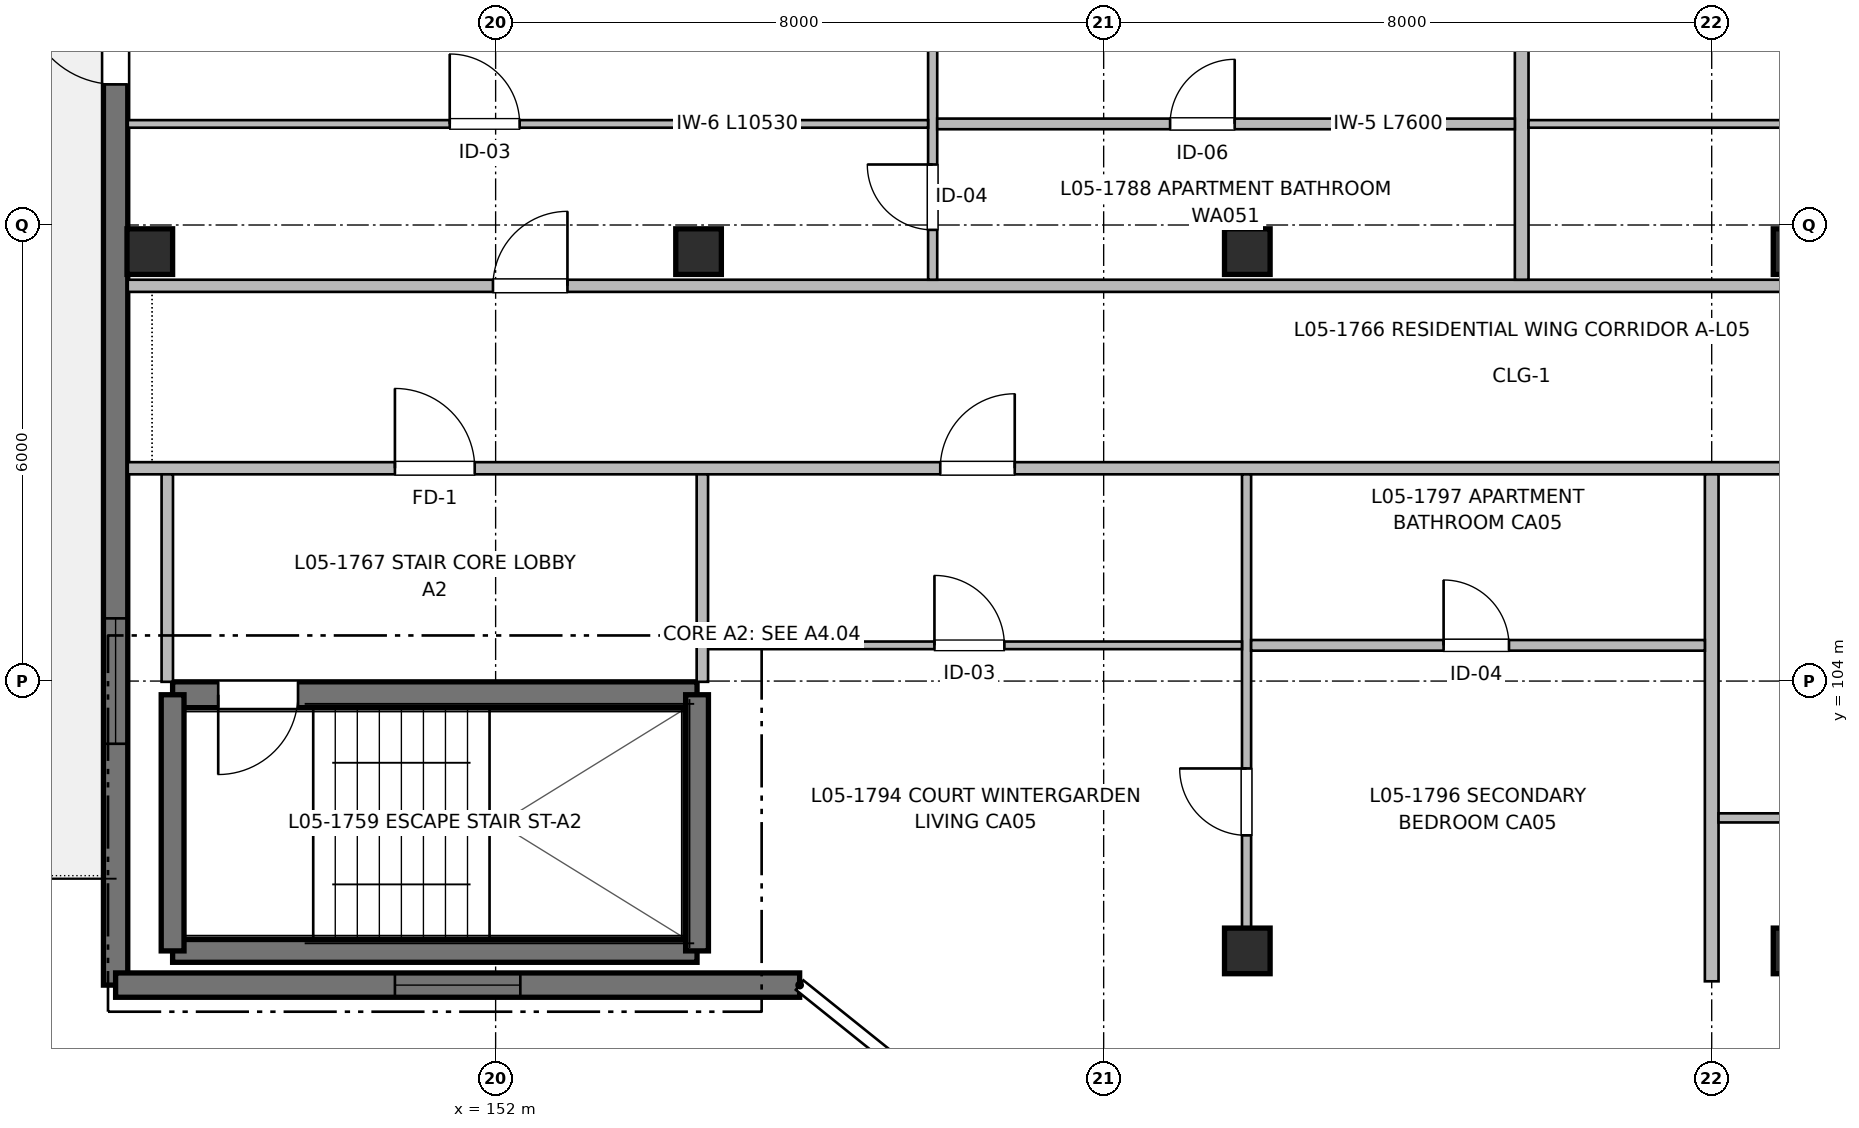
"""IFC4 building model, lengths in metres.
Left out: names, types, materials, properties, quantities, classifications, styles, units other than length and angle.
Written with IfcOpenShell. Run it as: python <this file> out.ifc"""

import sys

from ifc_helpers import new_model, si_unit, direction, frame, frame_2d, origin, origin_2d, place, context, subcontext, project, spatial, rectangle, extrude, element, fill, save


model = new_model("IFC4")
c1 = context("Model", 3, precision=1e-05, world=origin(), true_north=direction((0.0, 1.0)))
c2 = subcontext(c1, "Body", "Model", "MODEL_VIEW")
j1 = project(units=[si_unit("LENGTHUNIT", "METRE"), si_unit("PLANEANGLEUNIT", "RADIAN")], contexts=[c1])
p1 = place(None, origin())
s1 = spatial("IfcSite", under=j1, at=p1, CompositionType="ELEMENT")
p2 = place(p1, origin())
s2 = spatial("IfcBuilding", under=s1, at=p2, CompositionType="ELEMENT")
p3 = place(p2, frame((0.0, 0.0, 16.96)))
s3 = spatial("IfcBuildingStorey", under=s2, at=p3, CompositionType="ELEMENT", Elevation=16.96)
for number, where, z_axis, x_axis in (
    (1, (147.45, 109.65, 0.0), (0.0, 0.0, 1.0), (1.0, 0.0, 0.0)),
    (2, (154.67, 109.65, 0.0), (0.0, 0.0, 1.0), (1.0, 0.0, 0.0)),
    (3, (161.89, 100.45, 0.0), (0.0, 0.0, 1.0), (1.0, 0.0, 0.0)),
    (4, (161.89, 109.65, 0.0), (0.0, 0.0, 1.0), (1.0, 0.0, 0.0)),
    (5, (169.11, 100.45, 0.0), (0.0, 0.0, 1.0), (1.0, 0.0, 0.0)),
    (6, (169.11, 109.65, 0.0), (0.0, 0.0, 1.0), (1.0, 0.0, 0.0)),
):
    element("IfcColumn", number, at=place(p3, frame(where, z_axis=z_axis, x_axis=x_axis)), inside=s3, PredefinedType="COLUMN", context=c2, shape_type="SweptSolid", body=[
        extrude(rectangle(XDim=0.6, YDim=0.6, at=origin_2d()), origin(), (0.0, 0.0, 1.0), 3.2),
    ])
p4 = place(p3, frame((147.75, 100.45, 0.0), z_axis=(0.0, 0.0, 1.0), x_axis=(1.0, 0.0, 0.0)))
e7 = element("IfcWall", 7, at=p4, inside=s3, PredefinedType="SHEAR", context=c2, shape_type="SweptSolid", body=[
    extrude(rectangle(XDim=6.9, YDim=0.3, at=frame_2d((3.45, 0.0))), origin(), (0.0, 0.0, 1.0), 3.2),
])
p5 = place(p3, frame((154.65, 103.82, 0.0), z_axis=(0.0, 0.0, 1.0), x_axis=(-1.0, 0.0, 0.0)))
e8 = element("IfcWall", 8, at=p5, inside=s3, PredefinedType="SHEAR", context=c2, shape_type="SweptSolid", body=[
    extrude(rectangle(XDim=6.9, YDim=0.34, at=frame_2d((3.45, 0.0))), origin(), (0.0, 0.0, 1.0), 3.2),
])
p6 = place(p5, frame((5.25, 0.0, 0.0)))
e9 = element("IfcOpeningElement", 9, at=p6, cuts=e8, PredefinedType="OPENING", context=c2, shape_type="SweptSolid", body=[
    extrude(rectangle(XDim=1.05, YDim=2.15, at=frame_2d((0.525, 1.075))), frame((0.0, 0.18, 0.0), z_axis=(0.0, -1.0, 0.0), x_axis=(1.0, 0.0, 0.0)), (0.0, 0.0, 1.0), 0.36),
])
for number, where, z_axis, x_axis in (
    (10, (147.75, 103.82, 0.0), (0.0, 0.0, 1.0), (0.0, -1.0, 0.0)),
    (11, (154.65, 100.45, 0.0), (0.0, 0.0, 1.0), (0.0, 1.0, 0.0)),
):
    element("IfcWall", number, at=place(p3, frame(where, z_axis=z_axis, x_axis=x_axis)), inside=s3, PredefinedType="SHEAR", context=c2, shape_type="SweptSolid", body=[
        extrude(rectangle(XDim=3.37, YDim=0.3, at=frame_2d((1.685, 0.0))), origin(), (0.0, 0.0, 1.0), 3.2),
    ])
p7 = place(p3, frame((147.0, 100.0, 0.0), z_axis=(0.0, 0.0, 1.0), x_axis=(0.0, 1.0, 0.0)))
e12 = element("IfcWall", 12, at=p7, inside=s3, PredefinedType="SHEAR", context=c2, shape_type="SweptSolid", body=[
    extrude(rectangle(XDim=16.0, YDim=0.32, at=frame_2d((8.0, 0.0))), origin(), (0.0, 0.0, 1.0), 2.98),
])
p8 = place(p7, frame((3.175, 0.0, 0.77)))
e13 = element("IfcOpeningElement", 13, at=p8, cuts=e12, PredefinedType="OPENING", context=c2, shape_type="SweptSolid", body=[
    extrude(rectangle(XDim=1.65, YDim=1.45, at=frame_2d((0.825, 0.725))), frame((0.0, 0.17, 0.0), z_axis=(0.0, -1.0, 0.0), x_axis=(1.0, 0.0, 0.0)), (0.0, 0.0, 1.0), 0.34),
])
p9 = place(p7, frame((11.85, 0.0, 0.0)))
e14 = element("IfcOpeningElement", 14, at=p9, cuts=e12, PredefinedType="OPENING", context=c2, shape_type="SweptSolid", body=[
    extrude(rectangle(XDim=1.2, YDim=2.2, at=frame_2d((0.6, 1.1))), frame((0.0, 0.17, 0.0), z_axis=(0.0, -1.0, 0.0), x_axis=(1.0, 0.0, 0.0)), (0.0, 0.0, 1.0), 0.34),
])
p10 = place(p7, frame((13.3, 0.0, 0.9)))
e15 = element("IfcOpeningElement", 15, at=p10, cuts=e12, PredefinedType="OPENING", context=c2, shape_type="SweptSolid", body=[
    extrude(rectangle(XDim=0.65, YDim=0.95, at=frame_2d((0.325, 0.475))), frame((0.0, 0.17, 0.0), z_axis=(0.0, -1.0, 0.0), x_axis=(1.0, 0.0, 0.0)), (0.0, 0.0, 1.0), 0.34),
])
p11 = place(p3, frame((156.0, 100.0, 0.0), z_axis=(0.0, 0.0, 1.0), x_axis=(-1.0, 0.0, 0.0)))
e16 = element("IfcWall", 16, at=p11, inside=s3, PredefinedType="SHEAR", context=c2, shape_type="SweptSolid", body=[
    extrude(rectangle(XDim=9.0, YDim=0.32, at=frame_2d((4.5, 0.0))), origin(), (0.0, 0.0, 1.0), 2.98),
])
p12 = place(p11, frame((3.675, 0.0, 0.77)))
e17 = element("IfcOpeningElement", 17, at=p12, cuts=e16, PredefinedType="OPENING", context=c2, shape_type="SweptSolid", body=[
    extrude(rectangle(XDim=1.65, YDim=1.45, at=frame_2d((0.825, 0.725))), frame((0.0, 0.17, 0.0), z_axis=(0.0, -1.0, 0.0), x_axis=(1.0, 0.0, 0.0)), (0.0, 0.0, 1.0), 0.34),
])
p13 = place(p3, frame((147.16, 106.8, 0.0), z_axis=(0.0, 0.0, 1.0), x_axis=(1.0, 0.0, 0.0)))
e18 = element("IfcWall", 18, at=p13, inside=s3, PredefinedType="PARTITIONING", context=c2, shape_type="SweptSolid", body=[
    extrude(rectangle(XDim=27.64, YDim=0.16, at=frame_2d((13.82, 0.0))), origin(), (0.0, 0.0, 1.0), 2.935),
])
p14 = place(p13, frame((3.515, 0.0, 0.0)))
e19 = element("IfcOpeningElement", 19, at=p14, cuts=e18, PredefinedType="OPENING", context=c2, shape_type="SweptSolid", body=[
    extrude(rectangle(XDim=1.05, YDim=2.15, at=frame_2d((0.525, 1.075))), frame((0.0, 0.09, 0.0), z_axis=(0.0, -1.0, 0.0), x_axis=(1.0, 0.0, 0.0)), (0.0, 0.0, 1.0), 0.18),
])
p15 = place(p13, frame((10.69, 0.0, 0.0)))
e20 = element("IfcOpeningElement", 20, at=p15, cuts=e18, PredefinedType="OPENING", context=c2, shape_type="SweptSolid", body=[
    extrude(rectangle(XDim=0.98, YDim=2.15, at=frame_2d((0.49, 1.075))), frame((0.0, 0.09, 0.0), z_axis=(0.0, -1.0, 0.0), x_axis=(1.0, 0.0, 0.0)), (0.0, 0.0, 1.0), 0.18),
])
p16 = place(p3, frame((147.16, 109.2, 0.0), z_axis=(0.0, 0.0, 1.0), x_axis=(1.0, 0.0, 0.0)))
e21 = element("IfcWall", 21, at=p16, inside=s3, PredefinedType="PARTITIONING", context=c2, shape_type="SweptSolid", body=[
    extrude(rectangle(XDim=36.68, YDim=0.16, at=frame_2d((18.34, 0.0))), origin(), (0.0, 0.0, 1.0), 2.935),
])
p17 = place(p16, frame((4.805, 0.0, 0.0)))
e22 = element("IfcOpeningElement", 22, at=p17, cuts=e21, PredefinedType="OPENING", context=c2, shape_type="SweptSolid", body=[
    extrude(rectangle(XDim=0.98, YDim=2.15, at=frame_2d((0.49, 1.075))), frame((0.0, 0.09, 0.0), z_axis=(0.0, -1.0, 0.0), x_axis=(1.0, 0.0, 0.0)), (0.0, 0.0, 1.0), 0.18),
])
p18 = place(p16, frame((23.235, 0.0, 0.0)))
e23 = element("IfcOpeningElement", 23, at=p18, cuts=e21, PredefinedType="OPENING", context=c2, shape_type="SweptSolid", body=[
    extrude(rectangle(XDim=0.98, YDim=2.15, at=frame_2d((0.49, 1.075))), frame((0.0, 0.09, 0.0), z_axis=(0.0, -1.0, 0.0), x_axis=(1.0, 0.0, 0.0)), (0.0, 0.0, 1.0), 0.18),
])
p19 = place(p3, frame((168.0, 100.05, 0.0), z_axis=(0.0, 0.0, 1.0), x_axis=(0.0, 1.0, 0.0)))
e24 = element("IfcWall", 24, at=p19, inside=s3, PredefinedType="PARTITIONING", context=c2, shape_type="SweptSolid", body=[
    extrude(rectangle(XDim=6.67, YDim=0.18, at=frame_2d((3.335, 0.0))), origin(), (0.0, 0.0, 1.0), 2.935),
])
for number, where, z_axis, x_axis in (
    (25, (147.68, 103.99, 0.0), (0.0, 0.0, 1.0), (0.0, 1.0, 0.0)),
    (26, (154.72, 103.99, 0.0), (0.0, 0.0, 1.0), (0.0, 1.0, 0.0)),
):
    element("IfcWall", number, at=place(p3, frame(where, z_axis=z_axis, x_axis=x_axis)), inside=s3, PredefinedType="PARTITIONING", context=c2, shape_type="SweptSolid", body=[
        extrude(rectangle(XDim=2.73, YDim=0.15, at=frame_2d((1.365, 0.0))), origin(), (0.0, 0.0, 1.0), 2.935),
    ])
p20 = place(p3, frame((168.09, 102.2, 0.0), z_axis=(0.0, 0.0, 1.0), x_axis=(1.0, 0.0, 0.0)))
e27 = element("IfcWall", 27, at=p20, inside=s3, PredefinedType="PARTITIONING", context=c2, shape_type="SweptSolid", body=[
    extrude(rectangle(XDim=4.19, YDim=0.12, at=frame_2d((2.095, 0.0))), origin(), (0.0, 0.0, 1.0), 2.935),
])
p21 = place(p20, frame((1.655, 0.0, 0.0)))
e28 = element("IfcOpeningElement", 28, at=p21, cuts=e27, PredefinedType="OPENING", context=c2, shape_type="SweptSolid", body=[
    extrude(rectangle(XDim=0.88, YDim=2.1, at=frame_2d((0.44, 1.05))), frame((0.0, 0.07, 0.0), z_axis=(0.0, -1.0, 0.0), x_axis=(1.0, 0.0, 0.0)), (0.0, 0.0, 1.0), 0.14),
])
p22 = place(p3, frame((165.5, 109.28, 0.0), z_axis=(0.0, 0.0, 1.0), x_axis=(0.0, 1.0, 0.0)))
e29 = element("IfcWall", 29, at=p22, inside=s3, PredefinedType="PARTITIONING", context=c2, shape_type="SweptSolid", body=[
    extrude(rectangle(XDim=6.59, YDim=0.18, at=frame_2d((3.295, 0.0))), origin(), (0.0, 0.0, 1.0), 2.935),
])
p23 = place(p3, frame((157.75, 109.28, 0.0), z_axis=(0.0, 0.0, 1.0), x_axis=(0.0, 1.0, 0.0)))
e30 = element("IfcWall", 30, at=p23, inside=s3, PredefinedType="PARTITIONING", context=c2, shape_type="SweptSolid", body=[
    extrude(rectangle(XDim=6.59, YDim=0.12, at=frame_2d((3.295, 0.0))), origin(), (0.0, 0.0, 1.0), 2.935),
])
p24 = place(p23, frame((0.656, 0.0, 0.0)))
e31 = element("IfcOpeningElement", 31, at=p24, cuts=e30, PredefinedType="OPENING", context=c2, shape_type="SweptSolid", body=[
    extrude(rectangle(XDim=0.86, YDim=2.1, at=frame_2d((0.43, 1.05))), frame((0.0, 0.07, 0.0), z_axis=(0.0, -1.0, 0.0), x_axis=(1.0, 0.0, 0.0)), (0.0, 0.0, 1.0), 0.14),
])
p25 = place(p23, frame((4.093, 0.0, 0.0)))
e32 = element("IfcOpeningElement", 32, at=p25, cuts=e30, PredefinedType="OPENING", context=c2, shape_type="SweptSolid", body=[
    extrude(rectangle(XDim=0.9, YDim=2.1, at=frame_2d((0.45, 1.05))), frame((0.0, 0.07, 0.0), z_axis=(0.0, -1.0, 0.0), x_axis=(1.0, 0.0, 0.0)), (0.0, 0.0, 1.0), 0.14),
])
p26 = place(p3, frame((157.81, 111.33, 0.0), z_axis=(0.0, 0.0, 1.0), x_axis=(1.0, 0.0, 0.0)))
e33 = element("IfcWall", 33, at=p26, inside=s3, PredefinedType="PARTITIONING", context=c2, shape_type="SweptSolid", body=[
    extrude(rectangle(XDim=7.6, YDim=0.14, at=frame_2d((3.8, 0.0))), origin(), (0.0, 0.0, 1.0), 2.935),
])
p27 = place(p26, frame((3.064, 0.0, 0.0)))
e34 = element("IfcOpeningElement", 34, at=p27, cuts=e33, PredefinedType="OPENING", context=c2, shape_type="SweptSolid", body=[
    extrude(rectangle(XDim=0.85, YDim=2.05, at=frame_2d((0.425, 1.025))), frame((0.0, 0.08, 0.0), z_axis=(0.0, -1.0, 0.0), x_axis=(1.0, 0.0, 0.0)), (0.0, 0.0, 1.0), 0.16),
])
p28 = place(p3, frame((147.16, 111.33, 0.0), z_axis=(0.0, 0.0, 1.0), x_axis=(1.0, 0.0, 0.0)))
e35 = element("IfcWall", 35, at=p28, inside=s3, PredefinedType="PARTITIONING", context=c2, shape_type="SweptSolid", body=[
    extrude(rectangle(XDim=10.53, YDim=0.1, at=frame_2d((5.265, 0.0))), origin(), (0.0, 0.0, 1.0), 2.935),
])
p29 = place(p28, frame((4.236, 0.0, 0.0)))
e36 = element("IfcOpeningElement", 36, at=p29, cuts=e35, PredefinedType="OPENING", context=c2, shape_type="SweptSolid", body=[
    extrude(rectangle(XDim=0.92, YDim=2.1, at=frame_2d((0.46, 1.05))), frame((0.0, 0.06, 0.0), z_axis=(0.0, -1.0, 0.0), x_axis=(1.0, 0.0, 0.0)), (0.0, 0.0, 1.0), 0.12),
])
p30 = place(p3, frame((165.59, 111.33, 0.0), z_axis=(0.0, 0.0, 1.0), x_axis=(1.0, 0.0, 0.0)))
e37 = element("IfcWall", 37, at=p30, inside=s3, PredefinedType="PARTITIONING", context=c2, shape_type="SweptSolid", body=[
    extrude(rectangle(XDim=10.53, YDim=0.1, at=frame_2d((5.265, 0.0))), origin(), (0.0, 0.0, 1.0), 2.935),
])
p31 = place(p30, frame((4.236, 0.0, 0.0)))
e38 = element("IfcOpeningElement", 38, at=p31, cuts=e37, PredefinedType="OPENING", context=c2, shape_type="SweptSolid", body=[
    extrude(rectangle(XDim=0.92, YDim=2.1, at=frame_2d((0.46, 1.05))), frame((0.0, 0.06, 0.0), z_axis=(0.0, -1.0, 0.0), x_axis=(1.0, 0.0, 0.0)), (0.0, 0.0, 1.0), 0.12),
])
p32 = place(p3, frame((161.88, 100.16, 0.0), z_axis=(0.0, 0.0, 1.0), x_axis=(0.0, 1.0, 0.0)))
e39 = element("IfcWall", 39, at=p32, inside=s3, PredefinedType="PARTITIONING", context=c2, shape_type="SweptSolid", body=[
    extrude(rectangle(XDim=6.56, YDim=0.12, at=frame_2d((3.28, 0.0))), origin(), (0.0, 0.0, 1.0), 2.68),
])
p33 = place(p32, frame((1.81, 0.0, 0.0)))
e40 = element("IfcOpeningElement", 40, at=p33, cuts=e39, PredefinedType="OPENING", context=c2, shape_type="SweptSolid", body=[
    extrude(rectangle(XDim=0.88, YDim=2.1, at=frame_2d((0.44, 1.05))), frame((0.0, 0.07, 0.0), z_axis=(0.0, -1.0, 0.0), x_axis=(1.0, 0.0, 0.0)), (0.0, 0.0, 1.0), 0.14),
])
p34 = place(p3, frame((161.94, 104.47, 0.0), z_axis=(0.0, 0.0, 1.0), x_axis=(1.0, 0.0, 0.0)))
e41 = element("IfcWall", 41, at=p34, inside=s3, PredefinedType="PARTITIONING", context=c2, shape_type="SweptSolid", body=[
    extrude(rectangle(XDim=5.97, YDim=0.14, at=frame_2d((2.985, 0.0))), origin(), (0.0, 0.0, 1.0), 2.935),
])
p35 = place(p34, frame((2.533, 0.0, 0.0)))
e42 = element("IfcOpeningElement", 42, at=p35, cuts=e41, PredefinedType="OPENING", context=c2, shape_type="SweptSolid", body=[
    extrude(rectangle(XDim=0.86, YDim=2.1, at=frame_2d((0.43, 1.05))), frame((0.0, 0.08, 0.0), z_axis=(0.0, -1.0, 0.0), x_axis=(1.0, 0.0, 0.0)), (0.0, 0.0, 1.0), 0.16),
])
p36 = place(p3, frame((154.8, 104.47, 0.0), z_axis=(0.0, 0.0, 1.0), x_axis=(1.0, 0.0, 0.0)))
e43 = element("IfcWall", 43, at=p36, inside=s3, PredefinedType="PARTITIONING", context=c2, shape_type="SweptSolid", body=[
    extrude(rectangle(XDim=7.02, YDim=0.1, at=frame_2d((3.51, 0.0))), origin(), (0.0, 0.0, 1.0), 2.935),
])
p37 = place(p36, frame((2.974, 0.0, 0.0)))
e44 = element("IfcOpeningElement", 44, at=p37, cuts=e43, PredefinedType="OPENING", context=c2, shape_type="SweptSolid", body=[
    extrude(rectangle(XDim=0.92, YDim=2.1, at=frame_2d((0.46, 1.05))), frame((0.0, 0.06, 0.0), z_axis=(0.0, -1.0, 0.0), x_axis=(1.0, 0.0, 0.0)), (0.0, 0.0, 1.0), 0.12),
])
p38 = place(p6, origin())
e45 = element("IfcDoor", 45, at=p38, inside=s3, OperationType="SINGLE_SWING_RIGHT", PredefinedType="DOOR", context=c2, shape_type="SweptSolid", body=[
    extrude(rectangle(XDim=1.05, YDim=2.15, at=frame_2d((0.525, 1.075))), frame((0.0, 0.025, 0.0), z_axis=(0.0, -1.0, 0.0), x_axis=(1.0, 0.0, 0.0)), (0.0, 0.0, 1.0), 0.05),
])
fill(e9, e45)
p39 = place(p8, origin())
e46 = element("IfcWindow", 46, at=p39, inside=s3, PartitioningType="SINGLE_PANEL", PredefinedType="WINDOW", context=c2, shape_type="SweptSolid", body=[
    extrude(rectangle(XDim=1.65, YDim=1.45, at=frame_2d((0.825, 0.725))), frame((0.0, 0.03, 0.0), z_axis=(0.0, -1.0, 0.0), x_axis=(1.0, 0.0, 0.0)), (0.0, 0.0, 1.0), 0.06),
])
fill(e13, e46)
p40 = place(p9, origin())
e47 = element("IfcDoor", 47, at=p40, inside=s3, OperationType="SINGLE_SWING_RIGHT", PredefinedType="DOOR", context=c2, shape_type="SweptSolid", body=[
    extrude(rectangle(XDim=1.2, YDim=2.2, at=frame_2d((0.6, 1.1))), frame((0.0, 0.025, 0.0), z_axis=(0.0, -1.0, 0.0), x_axis=(1.0, 0.0, 0.0)), (0.0, 0.0, 1.0), 0.05),
])
fill(e14, e47)
p41 = place(p12, origin())
e48 = element("IfcWindow", 48, at=p41, inside=s3, PartitioningType="SINGLE_PANEL", PredefinedType="WINDOW", context=c2, shape_type="SweptSolid", body=[
    extrude(rectangle(XDim=1.65, YDim=1.45, at=frame_2d((0.825, 0.725))), frame((0.0, 0.03, 0.0), z_axis=(0.0, -1.0, 0.0), x_axis=(1.0, 0.0, 0.0)), (0.0, 0.0, 1.0), 0.06),
])
fill(e17, e48)
p42 = place(p14, origin())
e49 = element("IfcDoor", 49, at=p42, inside=s3, OperationType="SINGLE_SWING_LEFT", PredefinedType="DOOR", context=c2, shape_type="SweptSolid", body=[
    extrude(rectangle(XDim=1.05, YDim=2.15, at=frame_2d((0.525, 1.075))), frame((0.0, 0.025, 0.0), z_axis=(0.0, -1.0, 0.0), x_axis=(1.0, 0.0, 0.0)), (0.0, 0.0, 1.0), 0.05),
])
fill(e19, e49)
p43 = place(p17, origin())
e50 = element("IfcDoor", 50, at=p43, inside=s3, OperationType="SINGLE_SWING_RIGHT", PredefinedType="DOOR", context=c2, shape_type="SweptSolid", body=[
    extrude(rectangle(XDim=0.98, YDim=2.15, at=frame_2d((0.49, 1.075))), frame((0.0, 0.025, 0.0), z_axis=(0.0, -1.0, 0.0), x_axis=(1.0, 0.0, 0.0)), (0.0, 0.0, 1.0), 0.05),
])
fill(e22, e50)
p44 = place(p29, origin())
e51 = element("IfcDoor", 51, at=p44, inside=s3, OperationType="SINGLE_SWING_LEFT", PredefinedType="DOOR", context=c2, shape_type="SweptSolid", body=[
    extrude(rectangle(XDim=0.92, YDim=2.1, at=frame_2d((0.46, 1.05))), frame((0.0, 0.025, 0.0), z_axis=(0.0, -1.0, 0.0), x_axis=(1.0, 0.0, 0.0)), (0.0, 0.0, 1.0), 0.05),
])
fill(e36, e51)
p45 = place(p24, origin())
e52 = element("IfcDoor", 52, at=p45, inside=s3, OperationType="SINGLE_SWING_RIGHT", PredefinedType="DOOR", context=c2, shape_type="SweptSolid", body=[
    extrude(rectangle(XDim=0.86, YDim=2.1, at=frame_2d((0.43, 1.05))), frame((0.0, 0.025, 0.0), z_axis=(0.0, -1.0, 0.0), x_axis=(1.0, 0.0, 0.0)), (0.0, 0.0, 1.0), 0.05),
])
fill(e31, e52)
p46 = place(p27, origin())
e53 = element("IfcDoor", 53, at=p46, inside=s3, OperationType="SINGLE_SWING_RIGHT", PredefinedType="DOOR", context=c2, shape_type="SweptSolid", body=[
    extrude(rectangle(XDim=0.85, YDim=2.05, at=frame_2d((0.425, 1.025))), frame((0.0, 0.025, 0.0), z_axis=(0.0, -1.0, 0.0), x_axis=(1.0, 0.0, 0.0)), (0.0, 0.0, 1.0), 0.05),
])
fill(e34, e53)
p47 = place(p15, origin())
e54 = element("IfcDoor", 54, at=p47, inside=s3, OperationType="SINGLE_SWING_RIGHT", PredefinedType="DOOR", context=c2, shape_type="SweptSolid", body=[
    extrude(rectangle(XDim=0.98, YDim=2.15, at=frame_2d((0.49, 1.075))), frame((0.0, 0.025, 0.0), z_axis=(0.0, -1.0, 0.0), x_axis=(1.0, 0.0, 0.0)), (0.0, 0.0, 1.0), 0.05),
])
fill(e20, e54)
p48 = place(p37, origin())
e55 = element("IfcDoor", 55, at=p48, inside=s3, OperationType="SINGLE_SWING_LEFT", PredefinedType="DOOR", context=c2, shape_type="SweptSolid", body=[
    extrude(rectangle(XDim=0.92, YDim=2.1, at=frame_2d((0.46, 1.05))), frame((0.0, 0.025, 0.0), z_axis=(0.0, -1.0, 0.0), x_axis=(1.0, 0.0, 0.0)), (0.0, 0.0, 1.0), 0.05),
])
fill(e44, e55)
p49 = place(p33, origin())
e56 = element("IfcDoor", 56, at=p49, inside=s3, OperationType="SINGLE_SWING_RIGHT", PredefinedType="DOOR", context=c2, shape_type="SweptSolid", body=[
    extrude(rectangle(XDim=0.88, YDim=2.1, at=frame_2d((0.44, 1.05))), frame((0.0, 0.025, 0.0), z_axis=(0.0, -1.0, 0.0), x_axis=(1.0, 0.0, 0.0)), (0.0, 0.0, 1.0), 0.05),
])
fill(e40, e56)
p50 = place(p35, origin())
e57 = element("IfcDoor", 57, at=p50, inside=s3, OperationType="SINGLE_SWING_LEFT", PredefinedType="DOOR", context=c2, shape_type="SweptSolid", body=[
    extrude(rectangle(XDim=0.86, YDim=2.1, at=frame_2d((0.43, 1.05))), frame((0.0, 0.025, 0.0), z_axis=(0.0, -1.0, 0.0), x_axis=(1.0, 0.0, 0.0)), (0.0, 0.0, 1.0), 0.05),
])
fill(e42, e57)
save(model, sys.argv[1])
